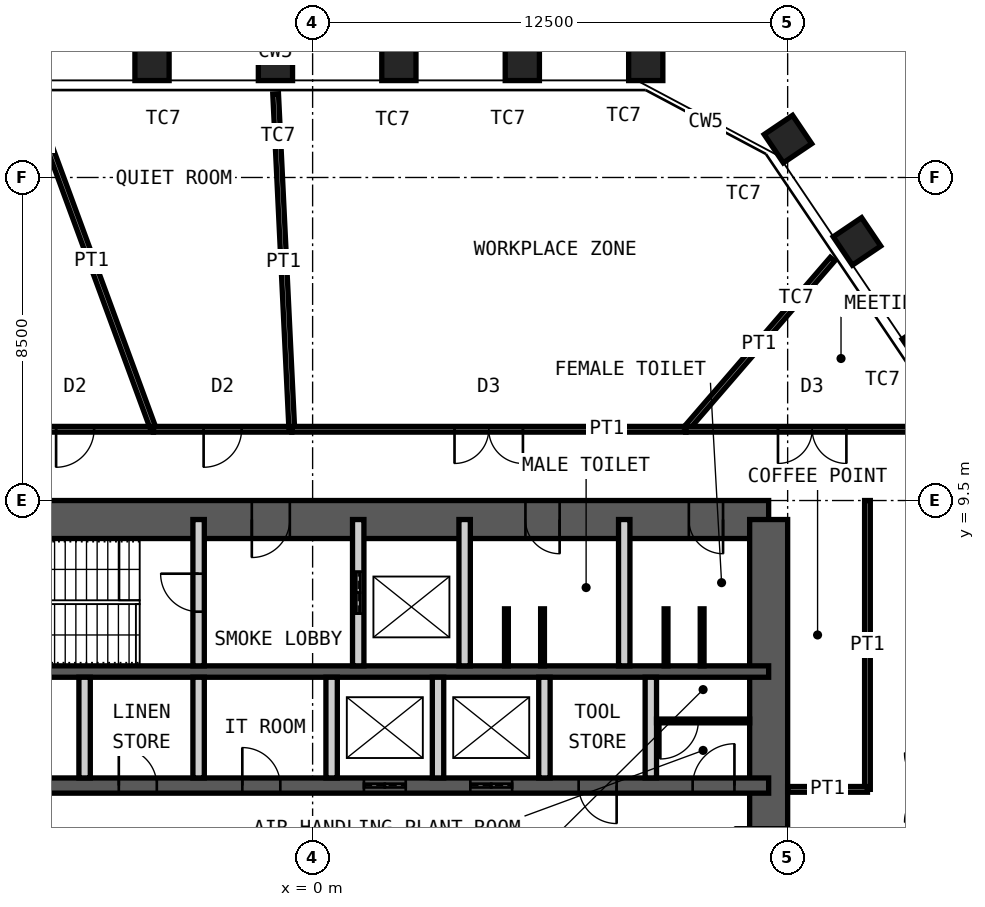
"""IFC4 building model, lengths in metres.
Left out: names, types, materials, properties, quantities, classifications, styles, units other than length and angle.
Written with IfcOpenShell. Run it as: python <this file> out.ifc"""

import sys

from ifc_helpers import new_model, si_unit, direction, frame, frame_2d, origin, origin_2d, place, context, subcontext, project, spatial, rectangle, hollow_rectangle, extrude, element, fill, save


model = new_model("IFC4")
c1 = context("Model", 3, precision=1e-05, world=origin(), true_north=direction((0.0, 1.0)))
c2 = subcontext(c1, "Body", "Model", "MODEL_VIEW")
j1 = project(units=[si_unit("LENGTHUNIT", "METRE"), si_unit("PLANEANGLEUNIT", "RADIAN")], contexts=[c1])
p1 = place(None, origin())
s1 = spatial("IfcSite", under=j1, at=p1, CompositionType="ELEMENT")
p2 = place(p1, origin())
s2 = spatial("IfcBuilding", under=s1, at=p2, CompositionType="ELEMENT")
p3 = place(p2, frame((0.0, 0.0, 274.6)))
s3 = spatial("IfcBuildingStorey", under=s2, at=p3, CompositionType="ELEMENT", Elevation=274.6)
for number, where, z_axis, x_axis in (
    (1, (-4.226, 21.0, 0.0), (0.0, 0.0, 1.0), (-1.0, 0.0, 0.0)),
    (2, (-0.978, 21.0, 0.0), (0.0, 0.0, 1.0), (-1.0, 0.0, 0.0)),
    (3, (2.27, 21.0, 0.0), (0.0, 0.0, 1.0), (-1.0, 0.0, 0.0)),
    (4, (5.518, 21.0, 0.0), (0.0, 0.0, 1.0), (-1.0, 0.0, 0.0)),
    (5, (8.766, 21.0, 0.0), (0.0, 0.0, 1.0), (-1.0, 0.0, 0.0)),
    (6, (12.508, 19.01, 0.0), (0.0, 0.0, 1.0), (-0.559, 0.829, 0.0)),
    (7, (14.324, 16.318, 0.0), (0.0, 0.0, 1.0), (-0.559, 0.829, 0.0)),
    (8, (16.141, 13.625, 0.0), (0.0, 0.0, 1.0), (-0.559, 0.829, 0.0)),
):
    element("IfcColumn", number, at=place(p3, frame(where, z_axis=z_axis, x_axis=x_axis)), inside=s3, PredefinedType="COLUMN", context=c2, shape_type="SweptSolid", body=[
        extrude(hollow_rectangle(XDim=0.9, YDim=0.9, WallThickness=0.06, at=origin_2d()), origin(), (0.0, 0.0, 1.0), 4.2),
    ])
p4 = place(p3, frame((-12.0, 9.0, 0.0), z_axis=(0.0, 0.0, 1.0), x_axis=(1.0, 0.0, 0.0)))
e9 = element("IfcWall", 9, at=p4, inside=s3, PredefinedType="SHEAR", context=c2, shape_type="SweptSolid", body=[
    extrude(rectangle(XDim=24.0, YDim=1.0, at=frame_2d((12.0, 0.0))), origin(), (0.0, 0.0, 1.0), 4.2),
])
p5 = place(p4, frame((10.4, 0.0, 0.0)))
e10 = element("IfcOpeningElement", 10, at=p5, cuts=e9, PredefinedType="OPENING", context=c2, shape_type="SweptSolid", body=[
    extrude(rectangle(XDim=1.0, YDim=2.1, at=frame_2d((0.5, 1.05))), frame((0.0, 0.51, 0.0), z_axis=(0.0, -1.0, 0.0), x_axis=(1.0, 0.0, 0.0)), (0.0, 0.0, 1.0), 1.02),
])
p6 = place(p4, frame((17.6, 0.0, 0.0)))
e11 = element("IfcOpeningElement", 11, at=p6, cuts=e9, PredefinedType="OPENING", context=c2, shape_type="SweptSolid", body=[
    extrude(rectangle(XDim=0.9, YDim=2.1, at=frame_2d((0.45, 1.05))), frame((0.0, 0.51, 0.0), z_axis=(0.0, -1.0, 0.0), x_axis=(1.0, 0.0, 0.0)), (0.0, 0.0, 1.0), 1.02),
])
p7 = place(p4, frame((21.9, 0.0, 0.0)))
e12 = element("IfcOpeningElement", 12, at=p7, cuts=e9, PredefinedType="OPENING", context=c2, shape_type="SweptSolid", body=[
    extrude(rectangle(XDim=0.9, YDim=2.1, at=frame_2d((0.45, 1.05))), frame((0.0, 0.51, 0.0), z_axis=(0.0, -1.0, 0.0), x_axis=(1.0, 0.0, 0.0)), (0.0, 0.0, 1.0), 1.02),
])
p8 = place(p3, frame((12.0, -9.0, 0.0), z_axis=(0.0, 0.0, 1.0), x_axis=(0.0, 1.0, 0.0)))
e13 = element("IfcWall", 13, at=p8, inside=s3, PredefinedType="SHEAR", context=c2, shape_type="SweptSolid", body=[
    extrude(rectangle(XDim=18.0, YDim=1.0, at=frame_2d((9.0, 0.0))), origin(), (0.0, 0.0, 1.0), 4.2),
])
p9 = place(p8, frame((8.1, 0.0, 0.0)))
e14 = element("IfcOpeningElement", 14, at=p9, cuts=e13, PredefinedType="OPENING", context=c2, shape_type="SweptSolid", body=[
    extrude(rectangle(XDim=1.8, YDim=2.1, at=frame_2d((0.9, 1.05))), frame((0.0, 0.51, 0.0), z_axis=(0.0, -1.0, 0.0), x_axis=(1.0, 0.0, 0.0)), (0.0, 0.0, 1.0), 1.02),
])
p10 = place(p3, frame((-12.0, 5.0, 0.0), z_axis=(0.0, 0.0, 1.0), x_axis=(1.0, 0.0, 0.0)))
e15 = element("IfcWall", 15, at=p10, inside=s3, PredefinedType="SHEAR", context=c2, shape_type="SweptSolid", body=[
    extrude(rectangle(XDim=24.0, YDim=0.3, at=frame_2d((12.0, 0.0))), origin(), (0.0, 0.0, 1.0), 4.2),
])
p11 = place(p3, frame((-12.0, 2.0, 0.0), z_axis=(0.0, 0.0, 1.0), x_axis=(1.0, 0.0, 0.0)))
e16 = element("IfcWall", 16, at=p11, inside=s3, PredefinedType="SHEAR", context=c2, shape_type="SweptSolid", body=[
    extrude(rectangle(XDim=24.0, YDim=0.4, at=frame_2d((12.0, 0.0))), origin(), (0.0, 0.0, 1.0), 4.2),
])
p12 = place(p11, frame((2.4, 0.0, 0.0)))
e17 = element("IfcOpeningElement", 17, at=p12, cuts=e16, PredefinedType="OPENING", context=c2, shape_type="SweptSolid", body=[
    extrude(rectangle(XDim=1.1, YDim=2.1, at=frame_2d((0.55, 1.05))), frame((0.0, 0.21, 0.0), z_axis=(0.0, -1.0, 0.0), x_axis=(1.0, 0.0, 0.0)), (0.0, 0.0, 1.0), 0.42),
])
p13 = place(p11, frame((22.0, 0.0, 0.0)))
e18 = element("IfcOpeningElement", 18, at=p13, cuts=e16, PredefinedType="OPENING", context=c2, shape_type="SweptSolid", body=[
    extrude(rectangle(XDim=1.1, YDim=2.1, at=frame_2d((0.55, 1.05))), frame((0.0, 0.21, 0.0), z_axis=(0.0, -1.0, 0.0), x_axis=(1.0, 0.0, 0.0)), (0.0, 0.0, 1.0), 0.42),
])
p14 = place(p11, frame((10.15, 0.0, 0.0)))
e19 = element("IfcOpeningElement", 19, at=p14, cuts=e16, PredefinedType="OPENING", context=c2, shape_type="SweptSolid", body=[
    extrude(rectangle(XDim=1.0, YDim=2.1, at=frame_2d((0.5, 1.05))), frame((0.0, 0.21, 0.0), z_axis=(0.0, -1.0, 0.0), x_axis=(1.0, 0.0, 0.0)), (0.0, 0.0, 1.0), 0.42),
])
p15 = place(p11, frame((6.9, 0.0, 0.0)))
e20 = element("IfcOpeningElement", 20, at=p15, cuts=e16, PredefinedType="OPENING", context=c2, shape_type="SweptSolid", body=[
    extrude(rectangle(XDim=1.0, YDim=2.1, at=frame_2d((0.5, 1.05))), frame((0.0, 0.21, 0.0), z_axis=(0.0, -1.0, 0.0), x_axis=(1.0, 0.0, 0.0)), (0.0, 0.0, 1.0), 0.42),
])
p16 = place(p11, frame((13.35, 0.0, 0.0)))
e21 = element("IfcOpeningElement", 21, at=p16, cuts=e16, PredefinedType="OPENING", context=c2, shape_type="SweptSolid", body=[
    extrude(rectangle(XDim=1.1, YDim=2.4, at=frame_2d((0.55, 1.2))), frame((0.0, 0.21, 0.0), z_axis=(0.0, -1.0, 0.0), x_axis=(1.0, 0.0, 0.0)), (0.0, 0.0, 1.0), 0.42),
])
p17 = place(p11, frame((16.15, 0.0, 0.0)))
e22 = element("IfcOpeningElement", 22, at=p17, cuts=e16, PredefinedType="OPENING", context=c2, shape_type="SweptSolid", body=[
    extrude(rectangle(XDim=1.1, YDim=2.4, at=frame_2d((0.55, 1.2))), frame((0.0, 0.21, 0.0), z_axis=(0.0, -1.0, 0.0), x_axis=(1.0, 0.0, 0.0)), (0.0, 0.0, 1.0), 0.42),
])
p18 = place(p11, frame((19.0, 0.0, 0.0)))
e23 = element("IfcOpeningElement", 23, at=p18, cuts=e16, PredefinedType="OPENING", context=c2, shape_type="SweptSolid", body=[
    extrude(rectangle(XDim=1.0, YDim=2.1, at=frame_2d((0.5, 1.05))), frame((0.0, 0.21, 0.0), z_axis=(0.0, -1.0, 0.0), x_axis=(1.0, 0.0, 0.0)), (0.0, 0.0, 1.0), 0.42),
])
p19 = place(p3, frame((-3.0, 5.15, 0.0), z_axis=(0.0, 0.0, 1.0), x_axis=(0.0, 1.0, 0.0)))
e24 = element("IfcWall", 24, at=p19, inside=s3, PredefinedType="PARTITIONING", context=c2, shape_type="SweptSolid", body=[
    extrude(rectangle(XDim=3.85, YDim=0.3, at=frame_2d((1.925, 0.0))), origin(), (0.0, 0.0, 1.0), 3.98),
])
p20 = place(p19, frame((1.425, 0.0, 0.0)))
e25 = element("IfcOpeningElement", 25, at=p20, cuts=e24, PredefinedType="OPENING", context=c2, shape_type="SweptSolid", body=[
    extrude(rectangle(XDim=1.0, YDim=2.1, at=frame_2d((0.5, 1.05))), frame((0.0, 0.16, 0.0), z_axis=(0.0, -1.0, 0.0), x_axis=(1.0, 0.0, 0.0)), (0.0, 0.0, 1.0), 0.32),
])
p21 = place(p3, frame((1.2, 5.15, 0.0), z_axis=(0.0, 0.0, 1.0), x_axis=(0.0, 1.0, 0.0)))
e26 = element("IfcWall", 26, at=p21, inside=s3, PredefinedType="PARTITIONING", context=c2, shape_type="SweptSolid", body=[
    extrude(rectangle(XDim=3.85, YDim=0.3, at=frame_2d((1.925, 0.0))), origin(), (0.0, 0.0, 1.0), 3.98),
])
p22 = place(p21, frame((1.375, 0.0, 0.0)))
e27 = element("IfcOpeningElement", 27, at=p22, cuts=e26, PredefinedType="OPENING", context=c2, shape_type="SweptSolid", body=[
    extrude(rectangle(XDim=1.1, YDim=2.4, at=frame_2d((0.55, 1.2))), frame((0.0, 0.16, 0.0), z_axis=(0.0, -1.0, 0.0), x_axis=(1.0, 0.0, 0.0)), (0.0, 0.0, 1.0), 0.32),
])
for number, where, z_axis, x_axis in (
    (28, (4.0, 5.15, 0.0), (0.0, 0.0, 1.0), (0.0, 1.0, 0.0)),
    (29, (8.2, 5.15, 0.0), (0.0, 0.0, 1.0), (0.0, 1.0, 0.0)),
):
    element("IfcWall", number, at=place(p3, frame(where, z_axis=z_axis, x_axis=x_axis)), inside=s3, PredefinedType="PARTITIONING", context=c2, shape_type="SweptSolid", body=[
        extrude(rectangle(XDim=3.85, YDim=0.3, at=frame_2d((1.925, 0.0))), origin(), (0.0, 0.0, 1.0), 3.98),
    ])
for number, where, z_axis, x_axis in (
    (30, (-6.0, 2.2, 0.0), (0.0, 0.0, 1.0), (0.0, 1.0, 0.0)),
    (31, (-3.0, 2.2, 0.0), (0.0, 0.0, 1.0), (0.0, 1.0, 0.0)),
    (32, (0.5, 2.2, 0.0), (0.0, 0.0, 1.0), (0.0, 1.0, 0.0)),
    (33, (3.3, 2.2, 0.0), (0.0, 0.0, 1.0), (0.0, 1.0, 0.0)),
    (34, (6.1, 2.2, 0.0), (0.0, 0.0, 1.0), (0.0, 1.0, 0.0)),
    (35, (8.9, 2.2, 0.0), (0.0, 0.0, 1.0), (0.0, 1.0, 0.0)),
):
    element("IfcWall", number, at=place(p3, frame(where, z_axis=z_axis, x_axis=x_axis)), inside=s3, PredefinedType="PARTITIONING", context=c2, shape_type="SweptSolid", body=[
        extrude(rectangle(XDim=2.65, YDim=0.3, at=frame_2d((1.325, 0.0))), origin(), (0.0, 0.0, 1.0), 3.98),
    ])
p23 = place(p3, frame((9.05, 3.7, 0.0), z_axis=(0.0, 0.0, 1.0), x_axis=(1.0, 0.0, 0.0)))
e36 = element("IfcWall", 36, at=p23, inside=s3, PredefinedType="PARTITIONING", context=c2, shape_type="SweptSolid", body=[
    extrude(rectangle(XDim=2.45, YDim=0.1, at=frame_2d((1.225, 0.0))), origin(), (0.0, 0.0, 1.0), 3.98),
])
p24 = place(p23, frame((0.1, 0.0, 0.0)))
e37 = element("IfcOpeningElement", 37, at=p24, cuts=e36, PredefinedType="OPENING", context=c2, shape_type="SweptSolid", body=[
    extrude(rectangle(XDim=1.0, YDim=2.4, at=frame_2d((0.5, 1.2))), frame((0.0, 0.06, 0.0), z_axis=(0.0, -1.0, 0.0), x_axis=(1.0, 0.0, 0.0)), (0.0, 0.0, 1.0), 0.12),
])
for number, where, z_axis, x_axis in (
    (38, (5.1, 5.15, 0.0), (0.0, 0.0, 1.0), (0.0, 1.0, 0.0)),
    (39, (6.05, 5.15, 0.0), (0.0, 0.0, 1.0), (0.0, 1.0, 0.0)),
    (40, (9.3, 5.15, 0.0), (0.0, 0.0, 1.0), (0.0, 1.0, 0.0)),
    (41, (10.25, 5.15, 0.0), (0.0, 0.0, 1.0), (0.0, 1.0, 0.0)),
):
    element("IfcWall", number, at=place(p3, frame(where, z_axis=z_axis, x_axis=x_axis)), inside=s3, PredefinedType="PARTITIONING", context=c2, shape_type="SweptSolid", body=[
        extrude(rectangle(XDim=1.5, YDim=0.1, at=frame_2d((0.75, 0.0))), origin(), (0.0, 0.0, 1.0), 2.1),
    ])
p25 = place(p3, frame((-8.312, 11.375, 0.0), z_axis=(0.0, 0.0, 1.0), x_axis=(1.0, 0.0, 0.0)))
e42 = element("IfcWall", 42, at=p25, inside=s3, PredefinedType="PARTITIONING", context=c2, shape_type="SweptSolid", body=[
    extrude(rectangle(XDim=4.124, YDim=0.15, at=frame_2d((2.062, 0.0))), origin(), (0.0, 0.0, 1.0), 4.03),
])
p26 = place(p25, frame((1.562, 0.0, 0.0)))
e43 = element("IfcOpeningElement", 43, at=p26, cuts=e42, PredefinedType="OPENING", context=c2, shape_type="SweptSolid", body=[
    extrude(rectangle(XDim=1.0, YDim=2.4, at=frame_2d((0.5, 1.2))), frame((0.0, 0.085, 0.0), z_axis=(0.0, -1.0, 0.0), x_axis=(1.0, 0.0, 0.0)), (0.0, 0.0, 1.0), 0.17),
])
p27 = place(p3, frame((-7.44, 20.206, 0.0), z_axis=(0.0, 0.0, 1.0), x_axis=(0.345510588088, -0.938414851502, 0.0)))
e44 = element("IfcWall", 44, at=p27, inside=s3, PredefinedType="PARTITIONING", context=c2, shape_type="SweptSolid", body=[
    extrude(rectangle(XDim=9.411, YDim=0.15, at=frame_2d((4.705, 0.0))), origin(), (0.0, 0.0, 1.0), 3.33),
])
p28 = place(p3, frame((-4.188, 11.375, 0.0), z_axis=(0.0, 0.0, 1.0), x_axis=(1.0, 0.0, 0.0)))
e45 = element("IfcWall", 45, at=p28, inside=s3, PredefinedType="PARTITIONING", context=c2, shape_type="SweptSolid", body=[
    extrude(rectangle(XDim=3.64, YDim=0.15, at=frame_2d((1.82, 0.0))), origin(), (0.0, 0.0, 1.0), 4.03),
])
p29 = place(p28, frame((1.32, 0.0, 0.0)))
e46 = element("IfcOpeningElement", 46, at=p29, cuts=e45, PredefinedType="OPENING", context=c2, shape_type="SweptSolid", body=[
    extrude(rectangle(XDim=1.0, YDim=2.4, at=frame_2d((0.5, 1.2))), frame((0.0, 0.085, 0.0), z_axis=(0.0, -1.0, 0.0), x_axis=(1.0, 0.0, 0.0)), (0.0, 0.0, 1.0), 0.17),
])
p30 = place(p3, frame((-0.973, 20.2, 0.0), z_axis=(0.0, 0.0, 1.0), x_axis=(0.048134910622, -0.998840843368, 0.0)))
e47 = element("IfcWall", 47, at=p30, inside=s3, PredefinedType="PARTITIONING", context=c2, shape_type="SweptSolid", body=[
    extrude(rectangle(XDim=8.835, YDim=0.15, at=frame_2d((4.418, 0.0))), origin(), (0.0, 0.0, 1.0), 3.33),
])
p31 = place(p3, frame((-0.548, 11.375, 0.0), z_axis=(0.0, 0.0, 1.0), x_axis=(1.0, 0.0, 0.0)))
e48 = element("IfcWall", 48, at=p31, inside=s3, PredefinedType="PARTITIONING", context=c2, shape_type="SweptSolid", body=[
    extrude(rectangle(XDim=10.365, YDim=0.15, at=frame_2d((5.182, 0.0))), origin(), (0.0, 0.0, 1.0), 4.03),
])
p32 = place(p31, frame((4.282, 0.0, 0.0)))
e49 = element("IfcOpeningElement", 49, at=p32, cuts=e48, PredefinedType="OPENING", context=c2, shape_type="SweptSolid", body=[
    extrude(rectangle(XDim=1.8, YDim=2.4, at=frame_2d((0.9, 1.2))), frame((0.0, 0.085, 0.0), z_axis=(0.0, -1.0, 0.0), x_axis=(1.0, 0.0, 0.0)), (0.0, 0.0, 1.0), 0.17),
])
p33 = place(p3, frame((13.678, 15.85, 0.0), z_axis=(0.0, 0.0, 1.0), x_axis=(-0.653328423077, -0.757074614288, 0.0)))
e50 = element("IfcWall", 50, at=p33, inside=s3, PredefinedType="PARTITIONING", context=c2, shape_type="SweptSolid", body=[
    extrude(rectangle(XDim=5.911, YDim=0.15, at=frame_2d((2.956, 0.0))), origin(), (0.0, 0.0, 1.0), 3.33),
])
p34 = place(p3, frame((9.816, 11.375, 0.0), z_axis=(0.0, 0.0, 1.0), x_axis=(1.0, 0.0, 0.0)))
e51 = element("IfcWall", 51, at=p34, inside=s3, PredefinedType="PARTITIONING", context=c2, shape_type="SweptSolid", body=[
    extrude(rectangle(XDim=6.659, YDim=0.15, at=frame_2d((3.329, 0.0))), origin(), (0.0, 0.0, 1.0), 4.03),
])
p35 = place(p34, frame((2.429, 0.0, 0.0)))
e52 = element("IfcOpeningElement", 52, at=p35, cuts=e51, PredefinedType="OPENING", context=c2, shape_type="SweptSolid", body=[
    extrude(rectangle(XDim=1.8, YDim=2.4, at=frame_2d((0.9, 1.2))), frame((0.0, 0.085, 0.0), z_axis=(0.0, -1.0, 0.0), x_axis=(1.0, 0.0, 0.0)), (0.0, 0.0, 1.0), 0.17),
])
p36 = place(p3, frame((14.6, 1.9, 0.0), z_axis=(0.0, 0.0, 1.0), x_axis=(0.0, 1.0, 0.0)))
e53 = element("IfcWall", 53, at=p36, inside=s3, PredefinedType="PARTITIONING", context=c2, shape_type="SweptSolid", body=[
    extrude(rectangle(XDim=7.6, YDim=0.15, at=frame_2d((3.8, 0.0))), origin(), (0.0, 0.0, 1.0), 4.03),
])
p37 = place(p3, frame((12.5, 1.9, 0.0), z_axis=(0.0, 0.0, 1.0), x_axis=(1.0, 0.0, 0.0)))
e54 = element("IfcWall", 54, at=p37, inside=s3, PredefinedType="PARTITIONING", context=c2, shape_type="SweptSolid", body=[
    extrude(rectangle(XDim=2.1, YDim=0.15, at=frame_2d((1.05, 0.0))), origin(), (0.0, 0.0, 1.0), 2.93),
])
p38 = place(p5, origin())
e55 = element("IfcDoor", 55, at=p38, inside=s3, OperationType="SINGLE_SWING_LEFT", PredefinedType="DOOR", context=c2, shape_type="SweptSolid", body=[
    extrude(rectangle(XDim=1.0, YDim=2.1, at=frame_2d((0.5, 1.05))), frame((0.0, 0.025, 0.0), z_axis=(0.0, -1.0, 0.0), x_axis=(1.0, 0.0, 0.0)), (0.0, 0.0, 1.0), 0.05),
])
fill(e10, e55)
p39 = place(p6, origin())
e56 = element("IfcDoor", 56, at=p39, inside=s3, OperationType="SINGLE_SWING_RIGHT", PredefinedType="DOOR", context=c2, shape_type="SweptSolid", body=[
    extrude(rectangle(XDim=0.9, YDim=2.1, at=frame_2d((0.45, 1.05))), frame((0.0, 0.025, 0.0), z_axis=(0.0, -1.0, 0.0), x_axis=(1.0, 0.0, 0.0)), (0.0, 0.0, 1.0), 0.05),
])
fill(e11, e56)
p40 = place(p7, origin())
e57 = element("IfcDoor", 57, at=p40, inside=s3, OperationType="SINGLE_SWING_RIGHT", PredefinedType="DOOR", context=c2, shape_type="SweptSolid", body=[
    extrude(rectangle(XDim=0.9, YDim=2.1, at=frame_2d((0.45, 1.05))), frame((0.0, 0.025, 0.0), z_axis=(0.0, -1.0, 0.0), x_axis=(1.0, 0.0, 0.0)), (0.0, 0.0, 1.0), 0.05),
])
fill(e12, e57)
p41 = place(p20, origin())
e58 = element("IfcDoor", 58, at=p41, inside=s3, OperationType="SINGLE_SWING_LEFT", PredefinedType="DOOR", context=c2, shape_type="SweptSolid", body=[
    extrude(rectangle(XDim=1.0, YDim=2.1, at=frame_2d((0.5, 1.05))), frame((0.0, 0.025, 0.0), z_axis=(0.0, -1.0, 0.0), x_axis=(1.0, 0.0, 0.0)), (0.0, 0.0, 1.0), 0.05),
])
fill(e25, e58)
p42 = place(p13, origin())
e59 = element("IfcDoor", 59, at=p42, inside=s3, OperationType="SINGLE_SWING_LEFT", PredefinedType="DOOR", context=c2, shape_type="SweptSolid", body=[
    extrude(rectangle(XDim=1.1, YDim=2.1, at=frame_2d((0.55, 1.05))), frame((0.0, 0.025, 0.0), z_axis=(0.0, -1.0, 0.0), x_axis=(1.0, 0.0, 0.0)), (0.0, 0.0, 1.0), 0.05),
])
fill(e18, e59)
p43 = place(p14, origin())
e60 = element("IfcDoor", 60, at=p43, inside=s3, OperationType="SINGLE_SWING_RIGHT", PredefinedType="DOOR", context=c2, shape_type="SweptSolid", body=[
    extrude(rectangle(XDim=1.0, YDim=2.1, at=frame_2d((0.5, 1.05))), frame((0.0, 0.025, 0.0), z_axis=(0.0, -1.0, 0.0), x_axis=(1.0, 0.0, 0.0)), (0.0, 0.0, 1.0), 0.05),
])
fill(e19, e60)
p44 = place(p9, origin())
e61 = element("IfcDoor", 61, at=p44, inside=s3, OperationType="DOUBLE_DOOR_DOUBLE_SWING", PredefinedType="DOOR", context=c2, shape_type="SweptSolid", body=[
    extrude(rectangle(XDim=1.8, YDim=2.1, at=frame_2d((0.9, 1.05))), frame((0.0, 0.025, 0.0), z_axis=(0.0, -1.0, 0.0), x_axis=(1.0, 0.0, 0.0)), (0.0, 0.0, 1.0), 0.05),
])
fill(e14, e61)
p45 = place(p22, origin())
e62 = element("IfcDoor", 62, at=p45, inside=s3, OperationType="DOUBLE_DOOR_SLIDING", PredefinedType="DOOR", context=c2, shape_type="SweptSolid", body=[
    extrude(rectangle(XDim=1.1, YDim=2.4, at=frame_2d((0.55, 1.2))), frame((0.0, 0.025, 0.0), z_axis=(0.0, -1.0, 0.0), x_axis=(1.0, 0.0, 0.0)), (0.0, 0.0, 1.0), 0.05),
])
fill(e27, e62)
p46 = place(p15, origin())
e63 = element("IfcDoor", 63, at=p46, inside=s3, OperationType="SINGLE_SWING_RIGHT", PredefinedType="DOOR", context=c2, shape_type="SweptSolid", body=[
    extrude(rectangle(XDim=1.0, YDim=2.1, at=frame_2d((0.5, 1.05))), frame((0.0, 0.025, 0.0), z_axis=(0.0, -1.0, 0.0), x_axis=(1.0, 0.0, 0.0)), (0.0, 0.0, 1.0), 0.05),
])
fill(e20, e63)
p47 = place(p16, origin())
e64 = element("IfcDoor", 64, at=p47, inside=s3, OperationType="DOUBLE_DOOR_SLIDING", PredefinedType="DOOR", context=c2, shape_type="SweptSolid", body=[
    extrude(rectangle(XDim=1.1, YDim=2.4, at=frame_2d((0.55, 1.2))), frame((0.0, 0.025, 0.0), z_axis=(0.0, -1.0, 0.0), x_axis=(1.0, 0.0, 0.0)), (0.0, 0.0, 1.0), 0.05),
])
fill(e21, e64)
p48 = place(p17, origin())
e65 = element("IfcDoor", 65, at=p48, inside=s3, OperationType="DOUBLE_DOOR_SLIDING", PredefinedType="DOOR", context=c2, shape_type="SweptSolid", body=[
    extrude(rectangle(XDim=1.1, YDim=2.4, at=frame_2d((0.55, 1.2))), frame((0.0, 0.025, 0.0), z_axis=(0.0, -1.0, 0.0), x_axis=(1.0, 0.0, 0.0)), (0.0, 0.0, 1.0), 0.05),
])
fill(e22, e65)
p49 = place(p18, origin())
e66 = element("IfcDoor", 66, at=p49, inside=s3, OperationType="SINGLE_SWING_RIGHT", PredefinedType="DOOR", context=c2, shape_type="SweptSolid", body=[
    extrude(rectangle(XDim=1.0, YDim=2.1, at=frame_2d((0.5, 1.05))), frame((0.0, 0.025, 0.0), z_axis=(0.0, -1.0, 0.0), x_axis=(1.0, 0.0, 0.0)), (0.0, 0.0, 1.0), 0.05),
])
fill(e23, e66)
p50 = place(p24, origin())
e67 = element("IfcDoor", 67, at=p50, inside=s3, OperationType="SINGLE_SWING_LEFT", PredefinedType="DOOR", context=c2, shape_type="SweptSolid", body=[
    extrude(rectangle(XDim=1.0, YDim=2.4, at=frame_2d((0.5, 1.2))), frame((0.0, 0.025, 0.0), z_axis=(0.0, -1.0, 0.0), x_axis=(1.0, 0.0, 0.0)), (0.0, 0.0, 1.0), 0.05),
])
fill(e37, e67)
p51 = place(p26, origin())
e68 = element("IfcDoor", 68, at=p51, inside=s3, OperationType="SINGLE_SWING_LEFT", PredefinedType="DOOR", context=c2, shape_type="SweptSolid", body=[
    extrude(rectangle(XDim=1.0, YDim=2.4, at=frame_2d((0.5, 1.2))), frame((0.0, 0.025, 0.0), z_axis=(0.0, -1.0, 0.0), x_axis=(1.0, 0.0, 0.0)), (0.0, 0.0, 1.0), 0.05),
])
fill(e43, e68)
p52 = place(p29, origin())
e69 = element("IfcDoor", 69, at=p52, inside=s3, OperationType="SINGLE_SWING_LEFT", PredefinedType="DOOR", context=c2, shape_type="SweptSolid", body=[
    extrude(rectangle(XDim=1.0, YDim=2.4, at=frame_2d((0.5, 1.2))), frame((0.0, 0.025, 0.0), z_axis=(0.0, -1.0, 0.0), x_axis=(1.0, 0.0, 0.0)), (0.0, 0.0, 1.0), 0.05),
])
fill(e46, e69)
p53 = place(p32, origin())
e70 = element("IfcDoor", 70, at=p53, inside=s3, OperationType="DOUBLE_DOOR_DOUBLE_SWING", PredefinedType="DOOR", context=c2, shape_type="SweptSolid", body=[
    extrude(rectangle(XDim=1.8, YDim=2.4, at=frame_2d((0.9, 1.2))), frame((0.0, 0.025, 0.0), z_axis=(0.0, -1.0, 0.0), x_axis=(1.0, 0.0, 0.0)), (0.0, 0.0, 1.0), 0.05),
])
fill(e49, e70)
p54 = place(p35, origin())
e71 = element("IfcDoor", 71, at=p54, inside=s3, OperationType="DOUBLE_DOOR_DOUBLE_SWING", PredefinedType="DOOR", context=c2, shape_type="SweptSolid", body=[
    extrude(rectangle(XDim=1.8, YDim=2.4, at=frame_2d((0.9, 1.2))), frame((0.0, 0.025, 0.0), z_axis=(0.0, -1.0, 0.0), x_axis=(1.0, 0.0, 0.0)), (0.0, 0.0, 1.0), 0.05),
])
fill(e52, e71)
save(model, sys.argv[1])
